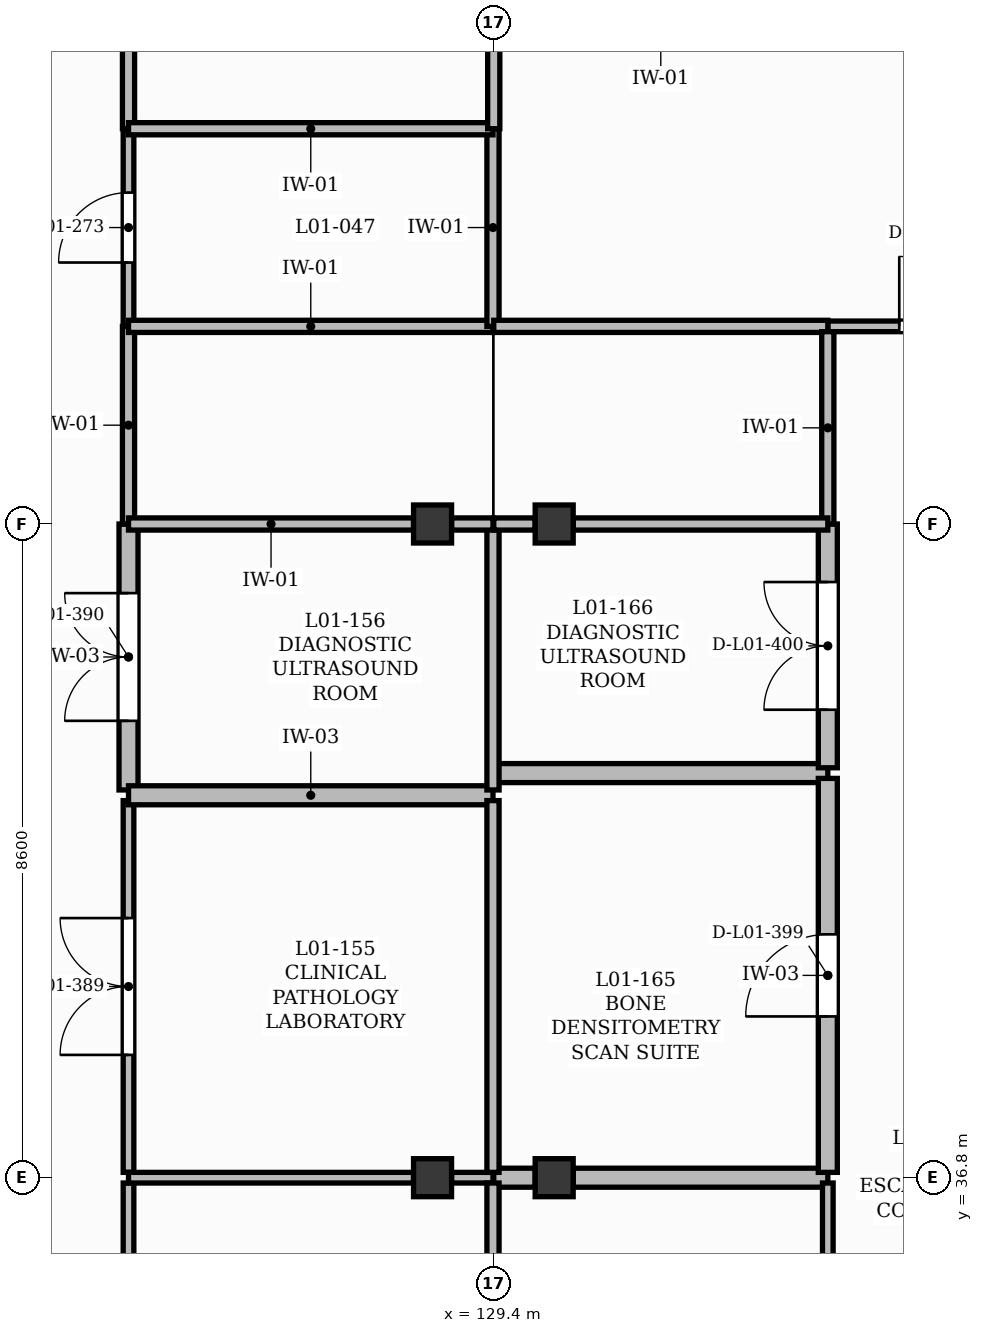
"""IFC4 building model, lengths in metres.
Left out: names, types, materials, properties, quantities, classifications, styles, units other than length and angle.
Written with IfcOpenShell. Run it as: python <this file> out.ifc"""

import sys

from ifc_helpers import new_model, si_unit, direction, frame, frame_2d, origin, origin_2d, place, context, subcontext, project, spatial, rectangle, extrude, element, fill, save


model = new_model("IFC4")
c1 = context("Model", 3, precision=1e-05, world=origin(), true_north=direction((0.0, 1.0)))
c2 = subcontext(c1, "Body", "Model", "MODEL_VIEW")
j1 = project(units=[si_unit("LENGTHUNIT", "METRE"), si_unit("PLANEANGLEUNIT", "RADIAN")], contexts=[c1])
p1 = place(None, origin())
s1 = spatial("IfcSite", under=j1, at=p1, CompositionType="ELEMENT")
p2 = place(p1, origin())
s2 = spatial("IfcBuilding", under=s1, at=p2, CompositionType="ELEMENT")
p3 = place(p2, frame((0.0, 0.0, 4.5)))
s3 = spatial("IfcBuildingStorey", under=s2, at=p3, CompositionType="ELEMENT", Elevation=4.5)
for number, where, z_axis, x_axis in (
    (1, (128.6, 36.8, 0.0), (0.0, 0.0, 1.0), (1.0, 0.0, 0.0)),
    (2, (128.6, 45.4, 0.0), (0.0, 0.0, 1.0), (1.0, 0.0, 0.0)),
    (3, (130.2, 36.8, 0.0), (0.0, 0.0, 1.0), (1.0, 0.0, 0.0)),
    (4, (130.2, 45.4, 0.0), (0.0, 0.0, 1.0), (1.0, 0.0, 0.0)),
):
    element("IfcColumn", number, at=place(p3, frame(where, z_axis=z_axis, x_axis=x_axis)), inside=s3, PredefinedType="COLUMN", context=c2, shape_type="SweptSolid", body=[
        extrude(rectangle(XDim=0.5, YDim=0.5, at=origin_2d()), origin(), (0.0, 0.0, 1.0), 4.22),
    ])
p4 = place(p3, frame((124.6, 30.764, 0.0), z_axis=(0.0, 0.0, 1.0), x_axis=(0.0, 1.0, 0.0)))
e5 = element("IfcWall", 5, at=p4, inside=s3, PredefinedType="PARTITIONING", context=c2, shape_type="SweptSolid", body=[
    extrude(rectangle(XDim=5.966, YDim=0.14, at=frame_2d((2.983, 0.0))), origin(), (0.0, 0.0, 1.0), 4.18),
])
p5 = place(p4, frame((2.403, 0.0, 0.0)))
e6 = element("IfcOpeningElement", 6, at=p5, cuts=e5, PredefinedType="OPENING", context=c2, shape_type="SweptSolid", body=[
    extrude(rectangle(XDim=1.16, YDim=2.1, at=frame_2d((0.58, 1.05))), frame((0.0, 0.08, 0.0), z_axis=(0.0, -1.0, 0.0), x_axis=(1.0, 0.0, 0.0)), (0.0, 0.0, 1.0), 0.16),
])
p6 = place(p3, frame((124.6, 36.87, 0.0), z_axis=(0.0, 0.0, 1.0), x_axis=(0.0, 1.0, 0.0)))
e7 = element("IfcWall", 7, at=p6, inside=s3, PredefinedType="PARTITIONING", context=c2, shape_type="SweptSolid", body=[
    extrude(rectangle(XDim=4.891, YDim=0.14, at=frame_2d((2.445, 0.0))), origin(), (0.0, 0.0, 1.0), 4.18),
])
p7 = place(p6, frame((1.545, 0.0, 0.0)))
e8 = element("IfcOpeningElement", 8, at=p7, cuts=e7, PredefinedType="OPENING", context=c2, shape_type="SweptSolid", body=[
    extrude(rectangle(XDim=1.8, YDim=2.3, at=frame_2d((0.9, 1.15))), frame((0.0, 0.08, 0.0), z_axis=(0.0, -1.0, 0.0), x_axis=(1.0, 0.0, 0.0)), (0.0, 0.0, 1.0), 0.16),
])
p8 = place(p3, frame((124.6, 36.8, 0.0), z_axis=(0.0, 0.0, 1.0), x_axis=(1.0, 0.0, 0.0)))
e9 = element("IfcWall", 9, at=p8, inside=s3, PredefinedType="PARTITIONING", context=c2, shape_type="SweptSolid", body=[
    extrude(rectangle(XDim=3.75, YDim=0.14, at=frame_2d((1.875, 0.0))), origin(), (0.0, 0.0, 1.0), 3.52),
])
p9 = place(p3, frame((128.85, 36.8, 0.0), z_axis=(0.0, 0.0, 1.0), x_axis=(1.0, 0.0, 0.0)))
e10 = element("IfcWall", 10, at=p9, inside=s3, PredefinedType="PARTITIONING", context=c2, shape_type="SweptSolid", body=[
    extrude(rectangle(XDim=0.545, YDim=0.14, at=frame_2d((0.272, 0.0))), origin(), (0.0, 0.0, 1.0), 4.18),
])
p10 = place(p3, frame((124.6, 41.901, 0.0), z_axis=(0.0, 0.0, 1.0), x_axis=(0.0, 1.0, 0.0)))
e11 = element("IfcWall", 11, at=p10, inside=s3, PredefinedType="SOLIDWALL", context=c2, shape_type="SweptSolid", body=[
    extrude(rectangle(XDim=3.499, YDim=0.25, at=frame_2d((1.75, 0.0))), origin(), (0.0, 0.0, 1.0), 4.18),
])
p11 = place(p10, frame((0.909, 0.0, 0.0)))
e12 = element("IfcOpeningElement", 12, at=p11, cuts=e11, PredefinedType="OPENING", context=c2, shape_type="SweptSolid", body=[
    extrude(rectangle(XDim=1.68, YDim=2.3, at=frame_2d((0.84, 1.15))), frame((0.0, 0.135, 0.0), z_axis=(0.0, -1.0, 0.0), x_axis=(1.0, 0.0, 0.0)), (0.0, 0.0, 1.0), 0.27),
])
p12 = place(p3, frame((124.6, 41.831, 0.0), z_axis=(0.0, 0.0, 1.0), x_axis=(1.0, 0.0, 0.0)))
e13 = element("IfcWall", 13, at=p12, inside=s3, PredefinedType="SOLIDWALL", context=c2, shape_type="SweptSolid", body=[
    extrude(rectangle(XDim=4.795, YDim=0.25, at=frame_2d((2.397, 0.0))), origin(), (0.0, 0.0, 1.0), 4.18),
])
p13 = place(p3, frame((124.6, 48.0, 0.0), z_axis=(0.0, 0.0, 1.0), x_axis=(0.0, 1.0, 0.0)))
e14 = element("IfcWall", 14, at=p13, inside=s3, PredefinedType="PARTITIONING", context=c2, shape_type="SweptSolid", body=[
    extrude(rectangle(XDim=2.6, YDim=0.14, at=frame_2d((1.3, 0.0))), origin(), (0.0, 0.0, 1.0), 4.18),
])
p14 = place(p13, frame((0.84, 0.0, 0.0)))
e15 = element("IfcOpeningElement", 15, at=p14, cuts=e14, PredefinedType="OPENING", context=c2, shape_type="SweptSolid", body=[
    extrude(rectangle(XDim=0.92, YDim=2.1, at=frame_2d((0.46, 1.05))), frame((0.0, 0.08, 0.0), z_axis=(0.0, -1.0, 0.0), x_axis=(1.0, 0.0, 0.0)), (0.0, 0.0, 1.0), 0.16),
])
p15 = place(p3, frame((129.405, 36.8, 0.0), z_axis=(0.0, 0.0, 1.0), x_axis=(1.0, 0.0, 0.0)))
e16 = element("IfcWall", 16, at=p15, inside=s3, PredefinedType="SOLIDWALL", context=c2, shape_type="SweptSolid", body=[
    extrude(rectangle(XDim=0.545, YDim=0.25, at=frame_2d((0.272, 0.0))), origin(), (0.0, 0.0, 1.0), 4.18),
])
p16 = place(p3, frame((130.45, 36.8, 0.0), z_axis=(0.0, 0.0, 1.0), x_axis=(1.0, 0.0, 0.0)))
e17 = element("IfcWall", 17, at=p16, inside=s3, PredefinedType="SOLIDWALL", context=c2, shape_type="SweptSolid", body=[
    extrude(rectangle(XDim=3.35, YDim=0.25, at=frame_2d((1.675, 0.0))), origin(), (0.0, 0.0, 1.0), 3.52),
])
p17 = place(p3, frame((129.405, 42.123, 0.0), z_axis=(0.0, 0.0, 1.0), x_axis=(1.0, 0.0, 0.0)))
e18 = element("IfcWall", 18, at=p17, inside=s3, PredefinedType="SOLIDWALL", context=c2, shape_type="SweptSolid", body=[
    extrude(rectangle(XDim=4.395, YDim=0.25, at=frame_2d((2.198, 0.0))), origin(), (0.0, 0.0, 1.0), 4.18),
])
p18 = place(p3, frame((133.8, 31.091, 0.0), z_axis=(0.0, 0.0, 1.0), x_axis=(0.0, 1.0, 0.0)))
e19 = element("IfcWall", 19, at=p18, inside=s3, PredefinedType="PARTITIONING", context=c2, shape_type="SweptSolid", body=[
    extrude(rectangle(XDim=5.639, YDim=0.14, at=frame_2d((2.819, 0.0))), origin(), (0.0, 0.0, 1.0), 4.18),
])
p19 = place(p18, frame((2.24, 0.0, 0.0)))
e20 = element("IfcOpeningElement", 20, at=p19, cuts=e19, PredefinedType="OPENING", context=c2, shape_type="SweptSolid", body=[
    extrude(rectangle(XDim=1.16, YDim=2.1, at=frame_2d((0.58, 1.05))), frame((0.0, 0.08, 0.0), z_axis=(0.0, -1.0, 0.0), x_axis=(1.0, 0.0, 0.0)), (0.0, 0.0, 1.0), 0.16),
])
p20 = place(p3, frame((133.8, 36.87, 0.0), z_axis=(0.0, 0.0, 1.0), x_axis=(0.0, 1.0, 0.0)))
e21 = element("IfcWall", 21, at=p20, inside=s3, PredefinedType="SOLIDWALL", context=c2, shape_type="SweptSolid", body=[
    extrude(rectangle(XDim=5.183, YDim=0.25, at=frame_2d((2.591, 0.0))), origin(), (0.0, 0.0, 1.0), 4.18),
])
p21 = place(p20, frame((2.052, 0.0, 0.0)))
e22 = element("IfcOpeningElement", 22, at=p21, cuts=e21, PredefinedType="OPENING", context=c2, shape_type="SweptSolid", body=[
    extrude(rectangle(XDim=1.08, YDim=2.15, at=frame_2d((0.54, 1.075))), frame((0.0, 0.135, 0.0), z_axis=(0.0, -1.0, 0.0), x_axis=(1.0, 0.0, 0.0)), (0.0, 0.0, 1.0), 0.27),
])
p22 = place(p3, frame((133.8, 42.193, 0.0), z_axis=(0.0, 0.0, 1.0), x_axis=(0.0, 1.0, 0.0)))
e23 = element("IfcWall", 23, at=p22, inside=s3, PredefinedType="SOLIDWALL", context=c2, shape_type="SweptSolid", body=[
    extrude(rectangle(XDim=3.207, YDim=0.25, at=frame_2d((1.604, 0.0))), origin(), (0.0, 0.0, 1.0), 4.18),
])
p23 = place(p22, frame((0.763, 0.0, 0.0)))
e24 = element("IfcOpeningElement", 24, at=p23, cuts=e23, PredefinedType="OPENING", context=c2, shape_type="SweptSolid", body=[
    extrude(rectangle(XDim=1.68, YDim=2.3, at=frame_2d((0.84, 1.15))), frame((0.0, 0.135, 0.0), z_axis=(0.0, -1.0, 0.0), x_axis=(1.0, 0.0, 0.0)), (0.0, 0.0, 1.0), 0.27),
])
p24 = place(p3, frame((133.8, 48.0, 0.0), z_axis=(0.0, 0.0, 1.0), x_axis=(1.0, 0.0, 0.0)))
e25 = element("IfcWall", 25, at=p24, inside=s3, PredefinedType="PARTITIONING", context=c2, shape_type="SweptSolid", body=[
    extrude(rectangle(XDim=2.8, YDim=0.14, at=frame_2d((1.4, 0.0))), origin(), (0.0, 0.0, 1.0), 4.18),
])
p25 = place(p24, frame((0.94, 0.0, 0.0)))
e26 = element("IfcOpeningElement", 26, at=p25, cuts=e25, PredefinedType="OPENING", context=c2, shape_type="SweptSolid", body=[
    extrude(rectangle(XDim=0.92, YDim=2.1, at=frame_2d((0.46, 1.05))), frame((0.0, 0.08, 0.0), z_axis=(0.0, -1.0, 0.0), x_axis=(1.0, 0.0, 0.0)), (0.0, 0.0, 1.0), 0.16),
])
p26 = place(p3, frame((124.6, 45.4, 0.0), z_axis=(0.0, 0.0, 1.0), x_axis=(0.0, 1.0, 0.0)))
e27 = element("IfcWall", 27, at=p26, inside=s3, PredefinedType="PARTITIONING", context=c2, shape_type="SweptSolid", body=[
    extrude(rectangle(XDim=2.6, YDim=0.16, at=frame_2d((1.3, 0.0))), origin(), (0.0, 0.0, 1.0), 4.18),
])
p27 = place(p3, frame((124.6, 50.6, 0.0), z_axis=(0.0, 0.0, 1.0), x_axis=(0.0, 1.0, 0.0)))
e28 = element("IfcWall", 28, at=p27, inside=s3, PredefinedType="PARTITIONING", context=c2, shape_type="SweptSolid", body=[
    extrude(rectangle(XDim=2.0, YDim=0.16, at=frame_2d((1.0, 0.0))), origin(), (0.0, 0.0, 1.0), 4.18),
])
p28 = place(p3, frame((124.6, 48.0, 0.0), z_axis=(0.0, 0.0, 1.0), x_axis=(1.0, 0.0, 0.0)))
e29 = element("IfcWall", 29, at=p28, inside=s3, PredefinedType="PARTITIONING", context=c2, shape_type="SweptSolid", body=[
    extrude(rectangle(XDim=4.795, YDim=0.16, at=frame_2d((2.397, 0.0))), origin(), (0.0, 0.0, 1.0), 4.18),
])
p29 = place(p3, frame((129.395, 48.0, 0.0), z_axis=(0.0, 0.0, 1.0), x_axis=(0.0, 1.0, 0.0)))
e30 = element("IfcWall", 30, at=p29, inside=s3, PredefinedType="PARTITIONING", context=c2, shape_type="SweptSolid", body=[
    extrude(rectangle(XDim=2.6, YDim=0.16, at=frame_2d((1.3, 0.0))), origin(), (0.0, 0.0, 1.0), 4.18),
])
p30 = place(p3, frame((129.395, 50.6, 0.0), z_axis=(0.0, 0.0, 1.0), x_axis=(-1.0, 0.0, 0.0)))
e31 = element("IfcWall", 31, at=p30, inside=s3, PredefinedType="PARTITIONING", context=c2, shape_type="SweptSolid", body=[
    extrude(rectangle(XDim=4.795, YDim=0.16, at=frame_2d((2.397, 0.0))), origin(), (0.0, 0.0, 1.0), 4.18),
])
p31 = place(p3, frame((129.405, 48.0, 0.0), z_axis=(0.0, 0.0, 1.0), x_axis=(1.0, 0.0, 0.0)))
e32 = element("IfcWall", 32, at=p31, inside=s3, PredefinedType="PARTITIONING", context=c2, shape_type="SweptSolid", body=[
    extrude(rectangle(XDim=4.395, YDim=0.16, at=frame_2d((2.198, 0.0))), origin(), (0.0, 0.0, 1.0), 4.18),
])
p32 = place(p3, frame((129.405, 50.6, 0.0), z_axis=(0.0, 0.0, 1.0), x_axis=(0.0, 1.0, 0.0)))
e33 = element("IfcWall", 33, at=p32, inside=s3, PredefinedType="PARTITIONING", context=c2, shape_type="SweptSolid", body=[
    extrude(rectangle(XDim=1.4, YDim=0.16, at=frame_2d((0.7, 0.0))), origin(), (0.0, 0.0, 1.0), 4.18),
])
p33 = place(p3, frame((133.8, 45.4, 0.0), z_axis=(0.0, 0.0, 1.0), x_axis=(0.0, 1.0, 0.0)))
e34 = element("IfcWall", 34, at=p33, inside=s3, PredefinedType="PARTITIONING", context=c2, shape_type="SweptSolid", body=[
    extrude(rectangle(XDim=2.53, YDim=0.16, at=frame_2d((1.265, 0.0))), origin(), (0.0, 0.0, 1.0), 4.18),
])
p34 = place(p3, frame((129.395, 30.764, 0.0), z_axis=(0.0, 0.0, 1.0), x_axis=(0.0, 1.0, 0.0)))
e35 = element("IfcWall", 35, at=p34, inside=s3, PredefinedType="PARTITIONING", context=c2, shape_type="SweptSolid", body=[
    extrude(rectangle(XDim=5.966, YDim=0.16, at=frame_2d((2.983, 0.0))), origin(), (0.0, 0.0, 1.0), 4.18),
])
p35 = place(p3, frame((129.395, 36.87, 0.0), z_axis=(0.0, 0.0, 1.0), x_axis=(0.0, 1.0, 0.0)))
e36 = element("IfcWall", 36, at=p35, inside=s3, PredefinedType="PARTITIONING", context=c2, shape_type="SweptSolid", body=[
    extrude(rectangle(XDim=4.891, YDim=0.16, at=frame_2d((2.445, 0.0))), origin(), (0.0, 0.0, 1.0), 4.18),
])
p36 = place(p3, frame((129.395, 41.901, 0.0), z_axis=(0.0, 0.0, 1.0), x_axis=(0.0, 1.0, 0.0)))
e37 = element("IfcWall", 37, at=p36, inside=s3, PredefinedType="PARTITIONING", context=c2, shape_type="SweptSolid", body=[
    extrude(rectangle(XDim=3.499, YDim=0.16, at=frame_2d((1.75, 0.0))), origin(), (0.0, 0.0, 1.0), 4.18),
])
p37 = place(p3, frame((129.395, 45.4, 0.0), z_axis=(0.0, 0.0, 1.0), x_axis=(-1.0, 0.0, 0.0)))
e38 = element("IfcWall", 38, at=p37, inside=s3, PredefinedType="PARTITIONING", context=c2, shape_type="SweptSolid", body=[
    extrude(rectangle(XDim=0.545, YDim=0.16, at=frame_2d((0.272, 0.0))), origin(), (0.0, 0.0, 1.0), 4.18),
])
p38 = place(p3, frame((128.35, 45.4, 0.0), z_axis=(0.0, 0.0, 1.0), x_axis=(-1.0, 0.0, 0.0)))
e39 = element("IfcWall", 39, at=p38, inside=s3, PredefinedType="PARTITIONING", context=c2, shape_type="SweptSolid", body=[
    extrude(rectangle(XDim=3.75, YDim=0.16, at=frame_2d((1.875, 0.0))), origin(), (0.0, 0.0, 1.0), 3.52),
])
p39 = place(p3, frame((133.8, 45.4, 0.0), z_axis=(0.0, 0.0, 1.0), x_axis=(-1.0, 0.0, 0.0)))
e40 = element("IfcWall", 40, at=p39, inside=s3, PredefinedType="PARTITIONING", context=c2, shape_type="SweptSolid", body=[
    extrude(rectangle(XDim=3.35, YDim=0.16, at=frame_2d((1.675, 0.0))), origin(), (0.0, 0.0, 1.0), 3.52),
])
p40 = place(p3, frame((129.95, 45.4, 0.0), z_axis=(0.0, 0.0, 1.0), x_axis=(-1.0, 0.0, 0.0)))
e41 = element("IfcWall", 41, at=p40, inside=s3, PredefinedType="PARTITIONING", context=c2, shape_type="SweptSolid", body=[
    extrude(rectangle(XDim=0.545, YDim=0.16, at=frame_2d((0.272, 0.0))), origin(), (0.0, 0.0, 1.0), 4.18),
])
p41 = place(p14, origin())
e42 = element("IfcDoor", 42, at=p41, inside=s3, OperationType="SINGLE_SWING_LEFT", PredefinedType="DOOR", context=c2, shape_type="SweptSolid", body=[
    extrude(rectangle(XDim=0.92, YDim=2.1, at=frame_2d((0.46, 1.05))), frame((0.0, 0.025, 0.0), z_axis=(0.0, -1.0, 0.0), x_axis=(1.0, 0.0, 0.0)), (0.0, 0.0, 1.0), 0.05),
])
fill(e15, e42)
p42 = place(p25, origin())
e43 = element("IfcDoor", 43, at=p42, inside=s3, OperationType="SINGLE_SWING_LEFT", PredefinedType="DOOR", context=c2, shape_type="SweptSolid", body=[
    extrude(rectangle(XDim=0.92, YDim=2.1, at=frame_2d((0.46, 1.05))), frame((0.0, 0.025, 0.0), z_axis=(0.0, -1.0, 0.0), x_axis=(1.0, 0.0, 0.0)), (0.0, 0.0, 1.0), 0.05),
])
fill(e26, e43)
p43 = place(p7, origin())
e44 = element("IfcDoor", 44, at=p43, inside=s3, OperationType="DOUBLE_DOOR_SINGLE_SWING", PredefinedType="DOOR", context=c2, shape_type="SweptSolid", body=[
    extrude(rectangle(XDim=1.8, YDim=2.3, at=frame_2d((0.9, 1.15))), frame((0.0, 0.025, 0.0), z_axis=(0.0, -1.0, 0.0), x_axis=(1.0, 0.0, 0.0)), (0.0, 0.0, 1.0), 0.05),
])
fill(e8, e44)
p44 = place(p11, origin())
e45 = element("IfcDoor", 45, at=p44, inside=s3, OperationType="DOUBLE_DOOR_SINGLE_SWING", PredefinedType="DOOR", context=c2, shape_type="SweptSolid", body=[
    extrude(rectangle(XDim=1.68, YDim=2.3, at=frame_2d((0.84, 1.15))), frame((0.0, 0.025, 0.0), z_axis=(0.0, -1.0, 0.0), x_axis=(1.0, 0.0, 0.0)), (0.0, 0.0, 1.0), 0.05),
])
fill(e12, e45)
p45 = place(p21, origin())
e46 = element("IfcDoor", 46, at=p45, inside=s3, OperationType="SINGLE_SWING_LEFT", PredefinedType="DOOR", context=c2, shape_type="SweptSolid", body=[
    extrude(rectangle(XDim=1.08, YDim=2.15, at=frame_2d((0.54, 1.075))), frame((0.0, 0.025, 0.0), z_axis=(0.0, -1.0, 0.0), x_axis=(1.0, 0.0, 0.0)), (0.0, 0.0, 1.0), 0.05),
])
fill(e22, e46)
p46 = place(p23, origin())
e47 = element("IfcDoor", 47, at=p46, inside=s3, OperationType="DOUBLE_DOOR_SINGLE_SWING", PredefinedType="DOOR", context=c2, shape_type="SweptSolid", body=[
    extrude(rectangle(XDim=1.68, YDim=2.3, at=frame_2d((0.84, 1.15))), frame((0.0, 0.025, 0.0), z_axis=(0.0, -1.0, 0.0), x_axis=(1.0, 0.0, 0.0)), (0.0, 0.0, 1.0), 0.05),
])
fill(e24, e47)
save(model, sys.argv[1])
